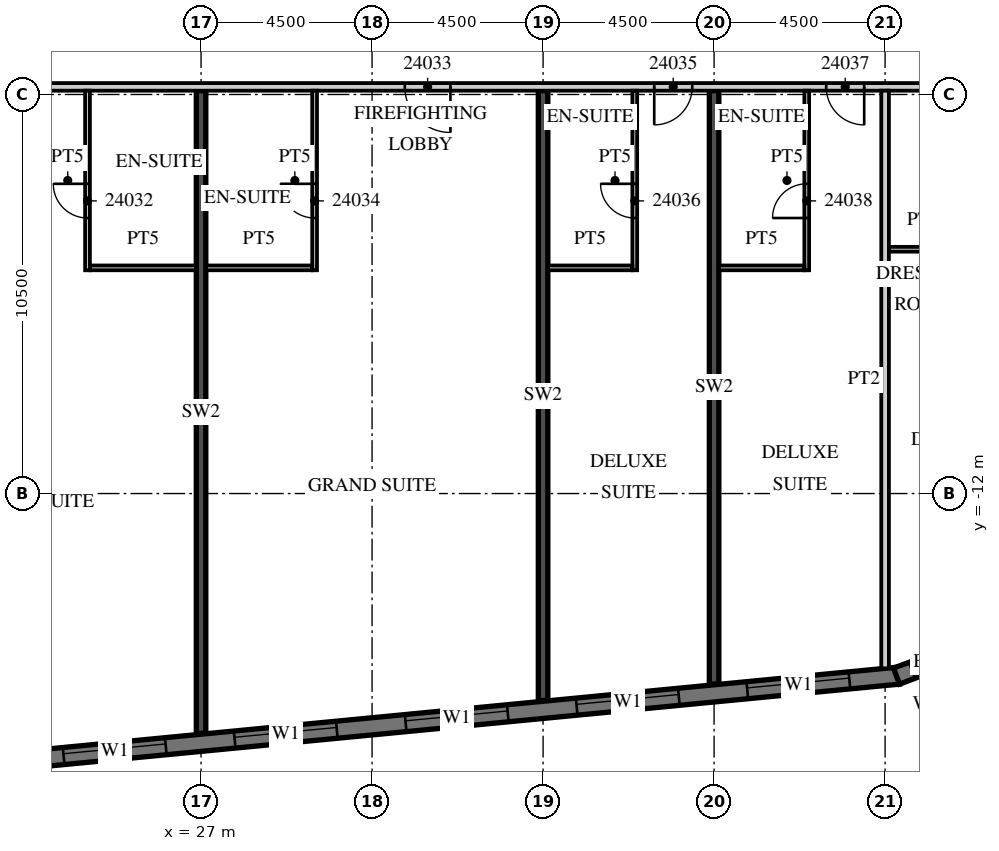
"""IFC4 building model, lengths in metres.
Left out: names, types, materials, properties, quantities, classifications, styles, units other than length and angle.
Written with IfcOpenShell. Run it as: python <this file> out.ifc"""

import sys

from ifc_helpers import new_model, si_unit, direction, frame, frame_2d, origin, place, context, subcontext, project, spatial, polyline, rectangle, outline, extrude, element, fill, save


model = new_model("IFC4")
c1 = context("Model", 3, precision=1e-05, world=origin(), true_north=direction((0.0, 1.0)))
c2 = subcontext(c1, "Body", "Model", "MODEL_VIEW")
j1 = project(units=[si_unit("LENGTHUNIT", "METRE"), si_unit("PLANEANGLEUNIT", "RADIAN")], contexts=[c1])
p1 = place(None, origin())
s1 = spatial("IfcSite", under=j1, at=p1, CompositionType="ELEMENT")
p2 = place(p1, origin())
s2 = spatial("IfcBuilding", under=s1, at=p2, CompositionType="ELEMENT")
p3 = place(p2, frame((0.0, 0.0, 114.1)))
s3 = spatial("IfcBuildingStorey", under=s2, at=p3, CompositionType="ELEMENT", Elevation=114.1)
p4 = place(p3, frame((27.0, -18.311, 0.0), z_axis=(0.0, 0.0, 1.0), x_axis=(0.0, 1.0, 0.0)))
e1 = element("IfcWall", 1, at=p4, inside=s3, PredefinedType="SHEAR", context=c2, shape_type="SweptSolid", body=[
    extrude(rectangle(XDim=16.911, YDim=0.25, at=frame_2d((8.455, 0.0))), origin(), (0.0, 0.0, 1.0), 3.3),
])
p5 = place(p3, frame((36.0, -17.444, 0.0), z_axis=(0.0, 0.0, 1.0), x_axis=(0.0, 1.0, 0.0)))
e2 = element("IfcWall", 2, at=p5, inside=s3, PredefinedType="SHEAR", context=c2, shape_type="SweptSolid", body=[
    extrude(rectangle(XDim=16.044, YDim=0.25, at=frame_2d((8.022, 0.0))), origin(), (0.0, 0.0, 1.0), 3.3),
])
p6 = place(p3, frame((40.5, -17.011, 0.0), z_axis=(0.0, 0.0, 1.0), x_axis=(0.0, 1.0, 0.0)))
e3 = element("IfcWall", 3, at=p6, inside=s3, PredefinedType="SHEAR", context=c2, shape_type="SweptSolid", body=[
    extrude(rectangle(XDim=15.611, YDim=0.25, at=frame_2d((7.805, 0.0))), origin(), (0.0, 0.0, 1.0), 3.3),
])
p7 = place(p3, frame((-13.521, -22.46, 0.0), z_axis=(0.0, 0.0, 1.0), x_axis=(0.995396096335, 0.095846812164, 0.0)))
e4 = element("IfcWall", 4, at=p7, inside=s3, PredefinedType="SOLIDWALL", context=c2, shape_type="SweptSolid", body=[
    extrude(rectangle(XDim=59.151, YDim=0.45, at=frame_2d((29.575, 0.0))), origin(), (0.0, 0.0, 1.0), 3.02),
])
p8 = place(p7, frame((0.91, 0.0, 0.45)))
e5 = element("IfcOpeningElement", 5, at=p8, cuts=e4, PredefinedType="OPENING", context=c2, shape_type="SweptSolid", body=[
    extrude(rectangle(XDim=2.7, YDim=2.25, at=frame_2d((1.35, 1.125))), frame((0.0, 0.235, 0.0), z_axis=(0.0, -1.0, 0.0), x_axis=(1.0, 0.0, 0.0)), (0.0, 0.0, 1.0), 0.47),
])
p9 = place(p7, frame((5.431, 0.0, 0.45)))
e6 = element("IfcOpeningElement", 6, at=p9, cuts=e4, PredefinedType="OPENING", context=c2, shape_type="SweptSolid", body=[
    extrude(rectangle(XDim=2.7, YDim=2.25, at=frame_2d((1.35, 1.125))), frame((0.0, 0.235, 0.0), z_axis=(0.0, -1.0, 0.0), x_axis=(1.0, 0.0, 0.0)), (0.0, 0.0, 1.0), 0.47),
])
p10 = place(p7, frame((9.952, 0.0, 0.45)))
e7 = element("IfcOpeningElement", 7, at=p10, cuts=e4, PredefinedType="OPENING", context=c2, shape_type="SweptSolid", body=[
    extrude(rectangle(XDim=2.7, YDim=2.25, at=frame_2d((1.35, 1.125))), frame((0.0, 0.235, 0.0), z_axis=(0.0, -1.0, 0.0), x_axis=(1.0, 0.0, 0.0)), (0.0, 0.0, 1.0), 0.47),
])
p11 = place(p7, frame((14.473, 0.0, 0.45)))
e8 = element("IfcOpeningElement", 8, at=p11, cuts=e4, PredefinedType="OPENING", context=c2, shape_type="SweptSolid", body=[
    extrude(rectangle(XDim=2.7, YDim=2.25, at=frame_2d((1.35, 1.125))), frame((0.0, 0.235, 0.0), z_axis=(0.0, -1.0, 0.0), x_axis=(1.0, 0.0, 0.0)), (0.0, 0.0, 1.0), 0.47),
])
p12 = place(p7, frame((18.994, 0.0, 0.45)))
e9 = element("IfcOpeningElement", 9, at=p12, cuts=e4, PredefinedType="OPENING", context=c2, shape_type="SweptSolid", body=[
    extrude(rectangle(XDim=2.7, YDim=2.25, at=frame_2d((1.35, 1.125))), frame((0.0, 0.235, 0.0), z_axis=(0.0, -1.0, 0.0), x_axis=(1.0, 0.0, 0.0)), (0.0, 0.0, 1.0), 0.47),
])
p13 = place(p7, frame((23.514, 0.0, 0.45)))
e10 = element("IfcOpeningElement", 10, at=p13, cuts=e4, PredefinedType="OPENING", context=c2, shape_type="SweptSolid", body=[
    extrude(rectangle(XDim=2.7, YDim=2.25, at=frame_2d((1.35, 1.125))), frame((0.0, 0.235, 0.0), z_axis=(0.0, -1.0, 0.0), x_axis=(1.0, 0.0, 0.0)), (0.0, 0.0, 1.0), 0.47),
])
p14 = place(p7, frame((28.035, 0.0, 0.45)))
e11 = element("IfcOpeningElement", 11, at=p14, cuts=e4, PredefinedType="OPENING", context=c2, shape_type="SweptSolid", body=[
    extrude(rectangle(XDim=2.7, YDim=2.25, at=frame_2d((1.35, 1.125))), frame((0.0, 0.235, 0.0), z_axis=(0.0, -1.0, 0.0), x_axis=(1.0, 0.0, 0.0)), (0.0, 0.0, 1.0), 0.47),
])
p15 = place(p7, frame((32.556, 0.0, 0.45)))
e12 = element("IfcOpeningElement", 12, at=p15, cuts=e4, PredefinedType="OPENING", context=c2, shape_type="SweptSolid", body=[
    extrude(rectangle(XDim=2.7, YDim=2.25, at=frame_2d((1.35, 1.125))), frame((0.0, 0.235, 0.0), z_axis=(0.0, -1.0, 0.0), x_axis=(1.0, 0.0, 0.0)), (0.0, 0.0, 1.0), 0.47),
])
p16 = place(p7, frame((37.077, 0.0, 0.45)))
e13 = element("IfcOpeningElement", 13, at=p16, cuts=e4, PredefinedType="OPENING", context=c2, shape_type="SweptSolid", body=[
    extrude(rectangle(XDim=2.7, YDim=2.25, at=frame_2d((1.35, 1.125))), frame((0.0, 0.235, 0.0), z_axis=(0.0, -1.0, 0.0), x_axis=(1.0, 0.0, 0.0)), (0.0, 0.0, 1.0), 0.47),
])
p17 = place(p7, frame((41.598, 0.0, 0.45)))
e14 = element("IfcOpeningElement", 14, at=p17, cuts=e4, PredefinedType="OPENING", context=c2, shape_type="SweptSolid", body=[
    extrude(rectangle(XDim=2.7, YDim=2.25, at=frame_2d((1.35, 1.125))), frame((0.0, 0.235, 0.0), z_axis=(0.0, -1.0, 0.0), x_axis=(1.0, 0.0, 0.0)), (0.0, 0.0, 1.0), 0.47),
])
p18 = place(p7, frame((46.118, 0.0, 0.45)))
e15 = element("IfcOpeningElement", 15, at=p18, cuts=e4, PredefinedType="OPENING", context=c2, shape_type="SweptSolid", body=[
    extrude(rectangle(XDim=2.7, YDim=2.25, at=frame_2d((1.35, 1.125))), frame((0.0, 0.235, 0.0), z_axis=(0.0, -1.0, 0.0), x_axis=(1.0, 0.0, 0.0)), (0.0, 0.0, 1.0), 0.47),
])
p19 = place(p7, frame((50.639, 0.0, 0.45)))
e16 = element("IfcOpeningElement", 16, at=p19, cuts=e4, PredefinedType="OPENING", context=c2, shape_type="SweptSolid", body=[
    extrude(rectangle(XDim=2.7, YDim=2.25, at=frame_2d((1.35, 1.125))), frame((0.0, 0.235, 0.0), z_axis=(0.0, -1.0, 0.0), x_axis=(1.0, 0.0, 0.0)), (0.0, 0.0, 1.0), 0.47),
])
p20 = place(p7, frame((55.15, 0.0, 0.45)))
e17 = element("IfcOpeningElement", 17, at=p20, cuts=e4, PredefinedType="OPENING", context=c2, shape_type="SweptSolid", body=[
    extrude(rectangle(XDim=2.7, YDim=2.25, at=frame_2d((1.35, 1.125))), frame((0.0, 0.235, 0.0), z_axis=(0.0, -1.0, 0.0), x_axis=(1.0, 0.0, 0.0)), (0.0, 0.0, 1.0), 0.47),
])
p21 = place(p3, frame((45.3, -16.804, 0.0), z_axis=(0.0, 0.0, 1.0), x_axis=(0.936677599948, 0.350192909346, 0.0)))
e18 = element("IfcWall", 18, at=p21, inside=s3, PredefinedType="SOLIDWALL", context=c2, shape_type="SweptSolid", body=[
    extrude(outline(polyline([(0.0, -0.225), (2.071, -0.225), (1.95, 0.225), (0.121, 0.225), (0.0, -0.225)])), origin(), (0.0, 0.0, 1.0), 3.02),
])
p22 = place(p21, frame((0.435, 0.0, 0.45)))
e19 = element("IfcOpeningElement", 19, at=p22, cuts=e18, PredefinedType="OPENING", context=c2, shape_type="SweptSolid", body=[
    extrude(rectangle(XDim=1.2, YDim=2.25, at=frame_2d((0.6, 1.125))), frame((0.0, 0.235, 0.0), z_axis=(0.0, -1.0, 0.0), x_axis=(1.0, 0.0, 0.0)), (0.0, 0.0, 1.0), 0.47),
])
p23 = place(p3, frame((48.753, -12.672, 0.0), z_axis=(0.0, 0.0, 1.0), x_axis=(-0.095842661909, 0.995396495954, 0.0)))
e20 = element("IfcWall", 20, at=p23, inside=s3, PredefinedType="SOLIDWALL", context=c2, shape_type="SweptSolid", body=[
    extrude(rectangle(XDim=35.0, YDim=0.45, at=frame_2d((17.5, 0.0))), origin(), (0.0, 0.0, 1.0), 3.02),
])
p24 = place(p23, frame((3.072, 0.0, 0.45)))
e21 = element("IfcOpeningElement", 21, at=p24, cuts=e20, PredefinedType="OPENING", context=c2, shape_type="SweptSolid", body=[
    extrude(rectangle(XDim=3.3, YDim=2.25, at=frame_2d((1.65, 1.125))), frame((0.0, 0.235, 0.0), z_axis=(0.0, -1.0, 0.0), x_axis=(1.0, 0.0, 0.0)), (0.0, 0.0, 1.0), 0.47),
])
p25 = place(p23, frame((7.593, 0.0, 0.45)))
e22 = element("IfcOpeningElement", 22, at=p25, cuts=e20, PredefinedType="OPENING", context=c2, shape_type="SweptSolid", body=[
    extrude(rectangle(XDim=3.3, YDim=2.25, at=frame_2d((1.65, 1.125))), frame((0.0, 0.235, 0.0), z_axis=(0.0, -1.0, 0.0), x_axis=(1.0, 0.0, 0.0)), (0.0, 0.0, 1.0), 0.47),
])
p26 = place(p3, frame((-13.5, -1.3, 0.0), z_axis=(0.0, 0.0, 1.0), x_axis=(1.0, 0.0, 0.0)))
e23 = element("IfcWall", 23, at=p26, inside=s3, PredefinedType="PARTITIONING", context=c2, shape_type="SweptSolid", body=[
    extrude(rectangle(XDim=60.932, YDim=0.2, at=frame_2d((30.466, 0.0))), origin(), (0.0, 0.0, 1.0), 3.02),
])
p27 = place(p26, frame((0.575, 0.0, 0.0)))
e24 = element("IfcOpeningElement", 24, at=p27, cuts=e23, PredefinedType="OPENING", context=c2, shape_type="SweptSolid", body=[
    extrude(rectangle(XDim=1.0, YDim=2.1, at=frame_2d((0.5, 1.05))), frame((0.0, 0.11, 0.0), z_axis=(0.0, -1.0, 0.0), x_axis=(1.0, 0.0, 0.0)), (0.0, 0.0, 1.0), 0.22),
])
p28 = place(p26, frame((5.075, 0.0, 0.0)))
e25 = element("IfcOpeningElement", 25, at=p28, cuts=e23, PredefinedType="OPENING", context=c2, shape_type="SweptSolid", body=[
    extrude(rectangle(XDim=1.0, YDim=2.1, at=frame_2d((0.5, 1.05))), frame((0.0, 0.11, 0.0), z_axis=(0.0, -1.0, 0.0), x_axis=(1.0, 0.0, 0.0)), (0.0, 0.0, 1.0), 0.22),
])
p29 = place(p26, frame((11.925, 0.0, 0.0)))
e26 = element("IfcOpeningElement", 26, at=p29, cuts=e23, PredefinedType="OPENING", context=c2, shape_type="SweptSolid", body=[
    extrude(rectangle(XDim=1.0, YDim=2.1, at=frame_2d((0.5, 1.05))), frame((0.0, 0.11, 0.0), z_axis=(0.0, -1.0, 0.0), x_axis=(1.0, 0.0, 0.0)), (0.0, 0.0, 1.0), 0.22),
])
p30 = place(p26, frame((15.938, 0.0, 0.0)))
e27 = element("IfcOpeningElement", 27, at=p30, cuts=e23, PredefinedType="OPENING", context=c2, shape_type="SweptSolid", body=[
    extrude(rectangle(XDim=1.2, YDim=2.1, at=frame_2d((0.6, 1.05))), frame((0.0, 0.11, 0.0), z_axis=(0.0, -1.0, 0.0), x_axis=(1.0, 0.0, 0.0)), (0.0, 0.0, 1.0), 0.22),
])
p31 = place(p26, frame((25.45, 0.0, 0.0)))
e28 = element("IfcOpeningElement", 28, at=p31, cuts=e23, PredefinedType="OPENING", context=c2, shape_type="SweptSolid", body=[
    extrude(rectangle(XDim=1.0, YDim=2.1, at=frame_2d((0.5, 1.05))), frame((0.0, 0.11, 0.0), z_axis=(0.0, -1.0, 0.0), x_axis=(1.0, 0.0, 0.0)), (0.0, 0.0, 1.0), 0.22),
])
p32 = place(p26, frame((27.55, 0.0, 0.0)))
e29 = element("IfcOpeningElement", 29, at=p32, cuts=e23, PredefinedType="OPENING", context=c2, shape_type="SweptSolid", body=[
    extrude(rectangle(XDim=1.0, YDim=2.1, at=frame_2d((0.5, 1.05))), frame((0.0, 0.11, 0.0), z_axis=(0.0, -1.0, 0.0), x_axis=(1.0, 0.0, 0.0)), (0.0, 0.0, 1.0), 0.22),
])
p33 = place(p26, frame((33.938, 0.0, 0.0)))
e30 = element("IfcOpeningElement", 30, at=p33, cuts=e23, PredefinedType="OPENING", context=c2, shape_type="SweptSolid", body=[
    extrude(rectangle(XDim=1.2, YDim=2.1, at=frame_2d((0.6, 1.05))), frame((0.0, 0.11, 0.0), z_axis=(0.0, -1.0, 0.0), x_axis=(1.0, 0.0, 0.0)), (0.0, 0.0, 1.0), 0.22),
])
p34 = place(p26, frame((45.862, 0.0, 0.0)))
e31 = element("IfcOpeningElement", 31, at=p34, cuts=e23, PredefinedType="OPENING", context=c2, shape_type="SweptSolid", body=[
    extrude(rectangle(XDim=1.2, YDim=2.1, at=frame_2d((0.6, 1.05))), frame((0.0, 0.11, 0.0), z_axis=(0.0, -1.0, 0.0), x_axis=(1.0, 0.0, 0.0)), (0.0, 0.0, 1.0), 0.22),
])
p35 = place(p26, frame((52.425, 0.0, 0.0)))
e32 = element("IfcOpeningElement", 32, at=p35, cuts=e23, PredefinedType="OPENING", context=c2, shape_type="SweptSolid", body=[
    extrude(rectangle(XDim=1.0, YDim=2.1, at=frame_2d((0.5, 1.05))), frame((0.0, 0.11, 0.0), z_axis=(0.0, -1.0, 0.0), x_axis=(1.0, 0.0, 0.0)), (0.0, 0.0, 1.0), 0.22),
])
p36 = place(p26, frame((56.95, 0.0, 0.0)))
e33 = element("IfcOpeningElement", 33, at=p36, cuts=e23, PredefinedType="OPENING", context=c2, shape_type="SweptSolid", body=[
    extrude(rectangle(XDim=1.0, YDim=2.1, at=frame_2d((0.5, 1.05))), frame((0.0, 0.11, 0.0), z_axis=(0.0, -1.0, 0.0), x_axis=(1.0, 0.0, 0.0)), (0.0, 0.0, 1.0), 0.22),
])
p37 = place(p26, frame((59.882, 0.0, 0.0)))
e34 = element("IfcOpeningElement", 34, at=p37, cuts=e23, PredefinedType="OPENING", context=c2, shape_type="SweptSolid", body=[
    extrude(rectangle(XDim=0.9, YDim=2.1, at=frame_2d((0.45, 1.05))), frame((0.0, 0.11, 0.0), z_axis=(0.0, -1.0, 0.0), x_axis=(1.0, 0.0, 0.0)), (0.0, 0.0, 1.0), 0.22),
])
p38 = place(p3, frame((24.012, -6.125, 0.0), z_axis=(0.0, 0.0, 1.0), x_axis=(0.0, 1.0, 0.0)))
e35 = element("IfcWall", 35, at=p38, inside=s3, PredefinedType="PARTITIONING", context=c2, shape_type="SweptSolid", body=[
    extrude(rectangle(XDim=4.725, YDim=0.125, at=frame_2d((2.363, 0.0))), origin(), (0.0, 0.0, 1.0), 3.02),
])
p39 = place(p38, frame((1.375, 0.0, 0.0)))
e36 = element("IfcOpeningElement", 36, at=p39, cuts=e35, PredefinedType="OPENING", context=c2, shape_type="SweptSolid", body=[
    extrude(rectangle(XDim=0.9, YDim=2.1, at=frame_2d((0.45, 1.05))), frame((0.0, 0.073, 0.0), z_axis=(0.0, -1.0, 0.0), x_axis=(1.0, 0.0, 0.0)), (0.0, 0.0, 1.0), 0.145),
])
p40 = place(p3, frame((24.075, -6.062, 0.0), z_axis=(0.0, 0.0, 1.0), x_axis=(1.0, 0.0, 0.0)))
e37 = element("IfcWall", 37, at=p40, inside=s3, PredefinedType="PARTITIONING", context=c2, shape_type="SweptSolid", body=[
    extrude(rectangle(XDim=2.8, YDim=0.125, at=frame_2d((1.4, 0.0))), origin(), (0.0, 0.0, 1.0), 3.02),
])
p41 = place(p3, frame((29.988, -6.125, 0.0), z_axis=(0.0, 0.0, 1.0), x_axis=(0.0, 1.0, 0.0)))
e38 = element("IfcWall", 38, at=p41, inside=s3, PredefinedType="PARTITIONING", context=c2, shape_type="SweptSolid", body=[
    extrude(rectangle(XDim=4.725, YDim=0.125, at=frame_2d((2.363, 0.0))), origin(), (0.0, 0.0, 1.0), 3.02),
])
p42 = place(p41, frame((1.375, 0.0, 0.0)))
e39 = element("IfcOpeningElement", 39, at=p42, cuts=e38, PredefinedType="OPENING", context=c2, shape_type="SweptSolid", body=[
    extrude(rectangle(XDim=0.9, YDim=2.1, at=frame_2d((0.45, 1.05))), frame((0.0, 0.073, 0.0), z_axis=(0.0, -1.0, 0.0), x_axis=(1.0, 0.0, 0.0)), (0.0, 0.0, 1.0), 0.145),
])
p43 = place(p3, frame((27.125, -6.062, 0.0), z_axis=(0.0, 0.0, 1.0), x_axis=(1.0, 0.0, 0.0)))
e40 = element("IfcWall", 40, at=p43, inside=s3, PredefinedType="PARTITIONING", context=c2, shape_type="SweptSolid", body=[
    extrude(rectangle(XDim=2.8, YDim=0.125, at=frame_2d((1.4, 0.0))), origin(), (0.0, 0.0, 1.0), 3.02),
])
p44 = place(p3, frame((38.413, -6.125, 0.0), z_axis=(0.0, 0.0, 1.0), x_axis=(0.0, 1.0, 0.0)))
e41 = element("IfcWall", 41, at=p44, inside=s3, PredefinedType="PARTITIONING", context=c2, shape_type="SweptSolid", body=[
    extrude(rectangle(XDim=4.725, YDim=0.125, at=frame_2d((2.363, 0.0))), origin(), (0.0, 0.0, 1.0), 3.02),
])
p45 = place(p44, frame((1.375, 0.0, 0.0)))
e42 = element("IfcOpeningElement", 42, at=p45, cuts=e41, PredefinedType="OPENING", context=c2, shape_type="SweptSolid", body=[
    extrude(rectangle(XDim=0.9, YDim=2.1, at=frame_2d((0.45, 1.05))), frame((0.0, 0.073, 0.0), z_axis=(0.0, -1.0, 0.0), x_axis=(1.0, 0.0, 0.0)), (0.0, 0.0, 1.0), 0.145),
])
p46 = place(p3, frame((36.125, -6.062, 0.0), z_axis=(0.0, 0.0, 1.0), x_axis=(1.0, 0.0, 0.0)))
e43 = element("IfcWall", 43, at=p46, inside=s3, PredefinedType="PARTITIONING", context=c2, shape_type="SweptSolid", body=[
    extrude(rectangle(XDim=2.225, YDim=0.125, at=frame_2d((1.113, 0.0))), origin(), (0.0, 0.0, 1.0), 3.02),
])
p47 = place(p3, frame((45.0, -16.599, 0.0), z_axis=(0.0, 0.0, 1.0), x_axis=(0.0, 1.0, 0.0)))
e44 = element("IfcWall", 44, at=p47, inside=s3, PredefinedType="PARTITIONING", context=c2, shape_type="SweptSolid", body=[
    extrude(rectangle(XDim=15.199, YDim=0.2, at=frame_2d((7.6, 0.0))), origin(), (0.0, 0.0, 1.0), 3.02),
])
p48 = place(p3, frame((42.938, -6.125, 0.0), z_axis=(0.0, 0.0, 1.0), x_axis=(0.0, 1.0, 0.0)))
e45 = element("IfcWall", 45, at=p48, inside=s3, PredefinedType="PARTITIONING", context=c2, shape_type="SweptSolid", body=[
    extrude(rectangle(XDim=4.725, YDim=0.125, at=frame_2d((2.363, 0.0))), origin(), (0.0, 0.0, 1.0), 3.02),
])
p49 = place(p48, frame((1.375, 0.0, 0.0)))
e46 = element("IfcOpeningElement", 46, at=p49, cuts=e45, PredefinedType="OPENING", context=c2, shape_type="SweptSolid", body=[
    extrude(rectangle(XDim=0.9, YDim=2.1, at=frame_2d((0.45, 1.05))), frame((0.0, 0.073, 0.0), z_axis=(0.0, -1.0, 0.0), x_axis=(1.0, 0.0, 0.0)), (0.0, 0.0, 1.0), 0.145),
])
p50 = place(p3, frame((40.625, -6.062, 0.0), z_axis=(0.0, 0.0, 1.0), x_axis=(1.0, 0.0, 0.0)))
e47 = element("IfcWall", 47, at=p50, inside=s3, PredefinedType="PARTITIONING", context=c2, shape_type="SweptSolid", body=[
    extrude(rectangle(XDim=2.25, YDim=0.125, at=frame_2d((1.125, 0.0))), origin(), (0.0, 0.0, 1.0), 3.02),
])
p51 = place(p3, frame((45.1, -5.572, 0.0), z_axis=(0.0, 0.0, 1.0), x_axis=(1.0, 0.0, 0.0)))
e48 = element("IfcWall", 48, at=p51, inside=s3, PredefinedType="PARTITIONING", context=c2, shape_type="SweptSolid", body=[
    extrude(rectangle(XDim=1.8, YDim=0.125, at=frame_2d((0.9, 0.0))), origin(), (0.0, 0.0, 1.0), 3.02),
])
p52 = place(p16, origin())
e49 = element("IfcWindow", 49, at=p52, inside=s3, PartitioningType="SINGLE_PANEL", PredefinedType="WINDOW", context=c2, shape_type="SweptSolid", body=[
    extrude(rectangle(XDim=2.7, YDim=2.25, at=frame_2d((1.35, 1.125))), frame((0.0, 0.09, 0.0), z_axis=(0.0, -1.0, 0.0), x_axis=(1.0, 0.0, 0.0)), (0.0, 0.0, 1.0), 0.06),
])
fill(e13, e49)
p53 = place(p17, origin())
e50 = element("IfcWindow", 50, at=p53, inside=s3, PartitioningType="SINGLE_PANEL", PredefinedType="WINDOW", context=c2, shape_type="SweptSolid", body=[
    extrude(rectangle(XDim=2.7, YDim=2.25, at=frame_2d((1.35, 1.125))), frame((0.0, 0.09, 0.0), z_axis=(0.0, -1.0, 0.0), x_axis=(1.0, 0.0, 0.0)), (0.0, 0.0, 1.0), 0.06),
])
fill(e14, e50)
p54 = place(p18, origin())
e51 = element("IfcWindow", 51, at=p54, inside=s3, PartitioningType="SINGLE_PANEL", PredefinedType="WINDOW", context=c2, shape_type="SweptSolid", body=[
    extrude(rectangle(XDim=2.7, YDim=2.25, at=frame_2d((1.35, 1.125))), frame((0.0, 0.09, 0.0), z_axis=(0.0, -1.0, 0.0), x_axis=(1.0, 0.0, 0.0)), (0.0, 0.0, 1.0), 0.06),
])
fill(e15, e51)
p55 = place(p19, origin())
e52 = element("IfcWindow", 52, at=p55, inside=s3, PartitioningType="SINGLE_PANEL", PredefinedType="WINDOW", context=c2, shape_type="SweptSolid", body=[
    extrude(rectangle(XDim=2.7, YDim=2.25, at=frame_2d((1.35, 1.125))), frame((0.0, 0.09, 0.0), z_axis=(0.0, -1.0, 0.0), x_axis=(1.0, 0.0, 0.0)), (0.0, 0.0, 1.0), 0.06),
])
fill(e16, e52)
p56 = place(p20, origin())
e53 = element("IfcWindow", 53, at=p56, inside=s3, PartitioningType="SINGLE_PANEL", PredefinedType="WINDOW", context=c2, shape_type="SweptSolid", body=[
    extrude(rectangle(XDim=2.7, YDim=2.25, at=frame_2d((1.35, 1.125))), frame((0.0, 0.09, 0.0), z_axis=(0.0, -1.0, 0.0), x_axis=(1.0, 0.0, 0.0)), (0.0, 0.0, 1.0), 0.06),
])
fill(e17, e53)
p57 = place(p22, origin())
e54 = element("IfcWindow", 54, at=p57, inside=s3, PartitioningType="SINGLE_PANEL", PredefinedType="WINDOW", context=c2, shape_type="SweptSolid", body=[
    extrude(rectangle(XDim=1.2, YDim=2.25, at=frame_2d((0.6, 1.125))), frame((0.0, 0.09, 0.0), z_axis=(0.0, -1.0, 0.0), x_axis=(1.0, 0.0, 0.0)), (0.0, 0.0, 1.0), 0.06),
])
fill(e19, e54)
p58 = place(p39, origin())
e55 = element("IfcDoor", 55, at=p58, inside=s3, OperationType="SINGLE_SWING_RIGHT", PredefinedType="DOOR", context=c2, shape_type="SweptSolid", body=[
    extrude(rectangle(XDim=0.9, YDim=2.1, at=frame_2d((0.45, 1.05))), frame((0.0, 0.025, 0.0), z_axis=(0.0, -1.0, 0.0), x_axis=(1.0, 0.0, 0.0)), (0.0, 0.0, 1.0), 0.05),
])
fill(e36, e55)
p59 = place(p34, origin())
e56 = element("IfcDoor", 56, at=p59, inside=s3, OperationType="SINGLE_SWING_RIGHT", PredefinedType="DOOR", context=c2, shape_type="SweptSolid", body=[
    extrude(rectangle(XDim=1.2, YDim=2.1, at=frame_2d((0.6, 1.05))), frame((0.0, 0.025, 0.0), z_axis=(0.0, -1.0, 0.0), x_axis=(1.0, 0.0, 0.0)), (0.0, 0.0, 1.0), 0.05),
])
fill(e31, e56)
p60 = place(p42, origin())
e57 = element("IfcDoor", 57, at=p60, inside=s3, OperationType="SINGLE_SWING_RIGHT", PredefinedType="DOOR", context=c2, shape_type="SweptSolid", body=[
    extrude(rectangle(XDim=0.9, YDim=2.1, at=frame_2d((0.45, 1.05))), frame((0.0, 0.025, 0.0), z_axis=(0.0, -1.0, 0.0), x_axis=(1.0, 0.0, 0.0)), (0.0, 0.0, 1.0), 0.05),
])
fill(e39, e57)
p61 = place(p35, origin())
e58 = element("IfcDoor", 58, at=p61, inside=s3, OperationType="SINGLE_SWING_LEFT", PredefinedType="DOOR", context=c2, shape_type="SweptSolid", body=[
    extrude(rectangle(XDim=1.0, YDim=2.1, at=frame_2d((0.5, 1.05))), frame((0.0, 0.025, 0.0), z_axis=(0.0, -1.0, 0.0), x_axis=(1.0, 0.0, 0.0)), (0.0, 0.0, 1.0), 0.05),
])
fill(e32, e58)
p62 = place(p45, origin())
e59 = element("IfcDoor", 59, at=p62, inside=s3, OperationType="SINGLE_SWING_RIGHT", PredefinedType="DOOR", context=c2, shape_type="SweptSolid", body=[
    extrude(rectangle(XDim=0.9, YDim=2.1, at=frame_2d((0.45, 1.05))), frame((0.0, 0.025, 0.0), z_axis=(0.0, -1.0, 0.0), x_axis=(1.0, 0.0, 0.0)), (0.0, 0.0, 1.0), 0.05),
])
fill(e42, e59)
p63 = place(p36, origin())
e60 = element("IfcDoor", 60, at=p63, inside=s3, OperationType="SINGLE_SWING_RIGHT", PredefinedType="DOOR", context=c2, shape_type="SweptSolid", body=[
    extrude(rectangle(XDim=1.0, YDim=2.1, at=frame_2d((0.5, 1.05))), frame((0.0, 0.025, 0.0), z_axis=(0.0, -1.0, 0.0), x_axis=(1.0, 0.0, 0.0)), (0.0, 0.0, 1.0), 0.05),
])
fill(e33, e60)
p64 = place(p49, origin())
e61 = element("IfcDoor", 61, at=p64, inside=s3, OperationType="SINGLE_SWING_LEFT", PredefinedType="DOOR", context=c2, shape_type="SweptSolid", body=[
    extrude(rectangle(XDim=0.9, YDim=2.1, at=frame_2d((0.45, 1.05))), frame((0.0, 0.025, 0.0), z_axis=(0.0, -1.0, 0.0), x_axis=(1.0, 0.0, 0.0)), (0.0, 0.0, 1.0), 0.05),
])
fill(e46, e61)
save(model, sys.argv[1])
